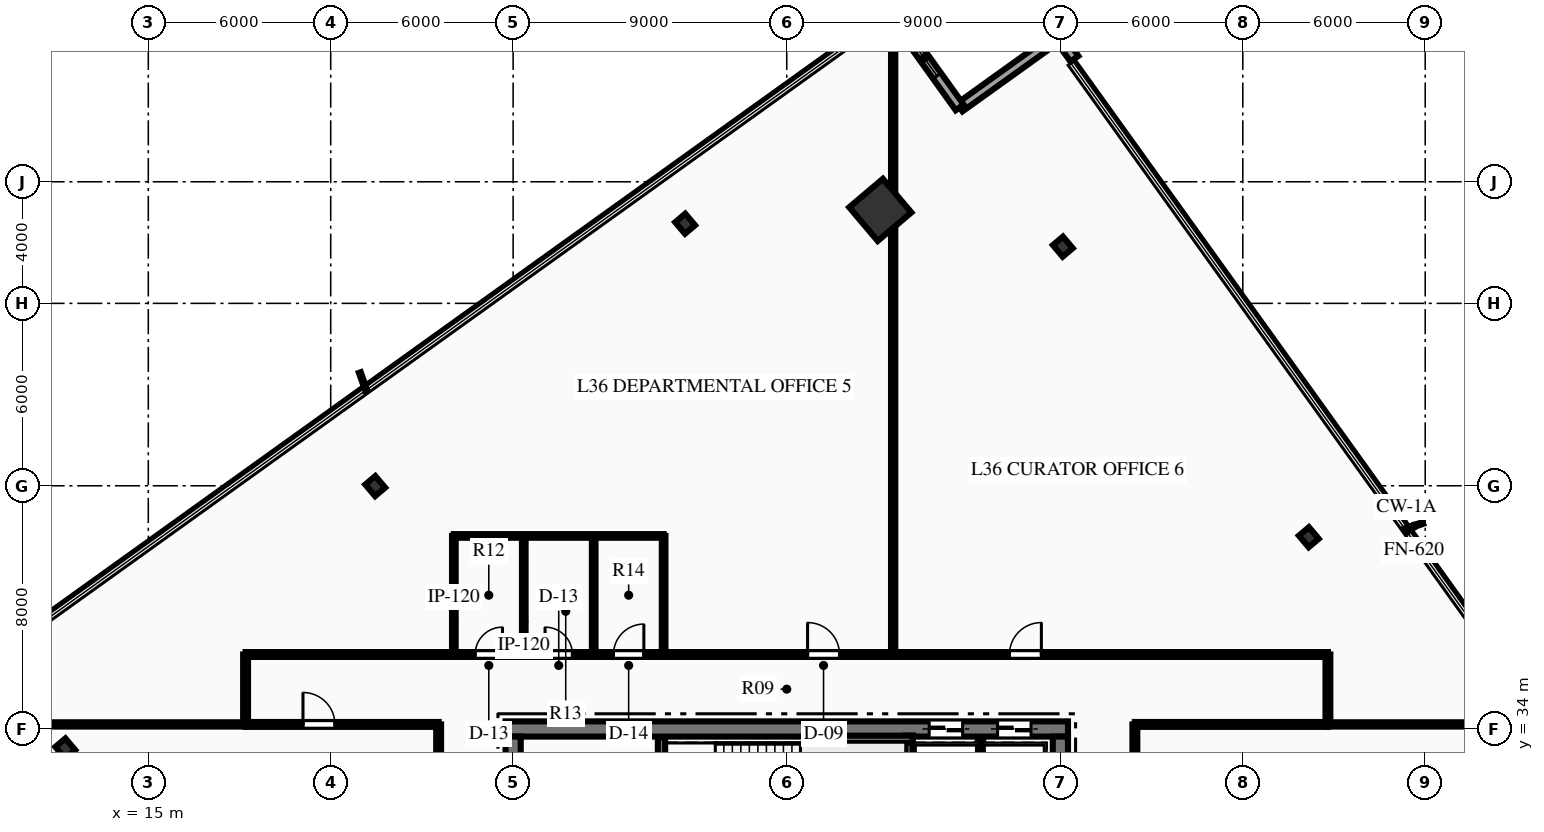
"""IFC4 building model, lengths in metres.
Left out: names, types, materials, properties, quantities, classifications, styles, units other than length and angle.
Written with IfcOpenShell. Run it as: python <this file> out.ifc"""

import sys

from ifc_helpers import new_model, si_unit, direction, frame, frame_2d, origin, origin_2d, place, context, subcontext, project, spatial, rectangle, hollow_rectangle, i_section, extrude, element, fill, save


model = new_model("IFC4")
c1 = context("Model", 3, precision=1e-05, world=origin(), true_north=direction((0.0, 1.0)))
c2 = subcontext(c1, "Body", "Model", "MODEL_VIEW")
j1 = project(units=[si_unit("LENGTHUNIT", "METRE"), si_unit("PLANEANGLEUNIT", "RADIAN")], contexts=[c1])
p1 = place(None, origin())
s1 = spatial("IfcSite", under=j1, at=p1, CompositionType="ELEMENT")
p2 = place(p1, origin())
s2 = spatial("IfcBuilding", under=s1, at=p2, CompositionType="ELEMENT")
p3 = place(p2, frame((0.0, 0.0, 148.2)))
s3 = spatial("IfcBuildingStorey", under=s2, at=p3, CompositionType="ELEMENT", Elevation=148.2)
p4 = place(p3, frame((26.75, 34.0, 0.0), z_axis=(0.0, 0.0, 1.0), x_axis=(1.0, 0.0, 0.0)))
e1 = element("IfcWall", 1, at=p4, inside=s3, PredefinedType="SHEAR", context=c2, shape_type="SweptSolid", body=[
    extrude(rectangle(XDim=18.5, YDim=0.5, at=frame_2d((9.25, 0.0))), origin(), (0.0, 0.0, 1.0), 3.75),
])
p5 = place(p4, frame((13.935, 0.0, 0.0)))
e2 = element("IfcOpeningElement", 2, at=p5, cuts=e1, PredefinedType="OPENING", context=c2, shape_type="SweptSolid", body=[
    extrude(rectangle(XDim=1.1, YDim=2.15, at=frame_2d((0.55, 1.075))), frame((0.0, 0.26, 0.0), z_axis=(0.0, -1.0, 0.0), x_axis=(1.0, 0.0, 0.0)), (0.0, 0.0, 1.0), 0.52),
])
p6 = place(p4, frame((16.185, 0.0, 0.0)))
e3 = element("IfcOpeningElement", 3, at=p6, cuts=e1, PredefinedType="OPENING", context=c2, shape_type="SweptSolid", body=[
    extrude(rectangle(XDim=1.1, YDim=2.15, at=frame_2d((0.55, 1.075))), frame((0.0, 0.26, 0.0), z_axis=(0.0, -1.0, 0.0), x_axis=(1.0, 0.0, 0.0)), (0.0, 0.0, 1.0), 0.52),
])
p7 = place(p3, frame((27.0, 18.25, 0.0), z_axis=(0.0, 0.0, 1.0), x_axis=(0.0, 1.0, 0.0)))
e4 = element("IfcWall", 4, at=p7, inside=s3, PredefinedType="SHEAR", context=c2, shape_type="SweptSolid", body=[
    extrude(rectangle(XDim=15.5, YDim=0.5, at=frame_2d((7.75, 0.0))), origin(), (0.0, 0.0, 1.0), 3.75),
])
p8 = place(p7, frame((9.99, 0.0, 0.0)))
e5 = element("IfcOpeningElement", 5, at=p8, cuts=e4, PredefinedType="OPENING", context=c2, shape_type="SweptSolid", body=[
    extrude(rectangle(XDim=1.4, YDim=2.2, at=frame_2d((0.7, 1.1))), frame((0.0, 0.26, 0.0), z_axis=(0.0, -1.0, 0.0), x_axis=(1.0, 0.0, 0.0)), (0.0, 0.0, 1.0), 0.52),
])
p9 = place(p3, frame((45.0, 18.25, 0.0), z_axis=(0.0, 0.0, 1.0), x_axis=(0.0, 1.0, 0.0)))
e6 = element("IfcWall", 6, at=p9, inside=s3, PredefinedType="SHEAR", context=c2, shape_type="SweptSolid", body=[
    extrude(rectangle(XDim=15.5, YDim=0.5, at=frame_2d((7.75, 0.0))), origin(), (0.0, 0.0, 1.0), 3.75),
])
p10 = place(p9, frame((9.99, 0.0, 0.0)))
e7 = element("IfcOpeningElement", 7, at=p10, cuts=e6, PredefinedType="OPENING", context=c2, shape_type="SweptSolid", body=[
    extrude(rectangle(XDim=1.4, YDim=2.2, at=frame_2d((0.7, 1.1))), frame((0.0, 0.26, 0.0), z_axis=(0.0, -1.0, 0.0), x_axis=(1.0, 0.0, 0.0)), (0.0, 0.0, 1.0), 0.52),
])
p11 = place(p3, frame((31.88, 29.93, 0.0), z_axis=(0.0, 0.0, 1.0), x_axis=(0.0, 1.0, 0.0)))
e8 = element("IfcWall", 8, at=p11, inside=s3, PredefinedType="SHEAR", context=c2, shape_type="SweptSolid", body=[
    extrude(rectangle(XDim=3.79, YDim=0.24, at=frame_2d((1.895, 0.0))), origin(), (0.0, 0.0, 1.0), 3.75),
])
p12 = place(p3, frame((40.02, 29.93, 0.0), z_axis=(0.0, 0.0, 1.0), x_axis=(0.0, 1.0, 0.0)))
e9 = element("IfcWall", 9, at=p12, inside=s3, PredefinedType="SHEAR", context=c2, shape_type="SweptSolid", body=[
    extrude(rectangle(XDim=3.85, YDim=0.24, at=frame_2d((1.925, 0.0))), origin(), (0.0, 0.0, 1.0), 3.75),
])
p13 = place(p3, frame((37.85, 33.66, 0.0), z_axis=(0.0, 0.0, 1.0), x_axis=(1.0, 0.0, 0.0)))
e10 = element("IfcWall", 10, at=p13, inside=s3, PredefinedType="SHEAR", context=c2, shape_type="SweptSolid", body=[
    extrude(rectangle(XDim=2.29, YDim=0.24, at=frame_2d((1.145, 0.0))), origin(), (0.0, 0.0, 1.0), 3.75),
])
p14 = place(p3, frame((39.077, 51.075, 0.0), z_axis=(0.0, 0.0, 1.0), x_axis=(0.763232469783, 0.646123979643, 0.0)))
e11 = element("IfcColumn", 11, at=p14, inside=s3, PredefinedType="COLUMN", context=c2, shape_type="SweptSolid", body=[
    extrude(hollow_rectangle(XDim=1.45, YDim=1.45, WallThickness=0.07, at=origin_2d()), origin(), (0.0, 0.0, 1.0), 3.75),
])
for number, where, z_axis, x_axis in (
    (12, (53.171, 40.307, 0.0), (0.0, 0.0, 1.0), (0.763, 0.646, 0.0)),
    (13, (45.08, 49.865, 0.0), (0.0, 0.0, 1.0), (0.763, 0.646, 0.0)),
    (14, (32.657, 50.619, 0.0), (0.0, 0.0, 1.0), (0.763, 0.646, 0.0)),
    (15, (22.464, 41.99, 0.0), (0.0, 0.0, 1.0), (0.763, 0.646, 0.0)),
    (16, (12.27, 33.36, 0.0), (0.0, 0.0, 1.0), (0.763, 0.646, 0.0)),
):
    element("IfcColumn", number, at=place(p3, frame(where, z_axis=z_axis, x_axis=x_axis)), inside=s3, PredefinedType="COLUMN", context=c2, shape_type="SweptSolid", body=[
        extrude(i_section(OverallWidth=0.432, OverallDepth=0.498, WebThickness=0.056, FlangeThickness=0.089, at=origin_2d()), origin(), (0.0, 0.0, 1.0), 3.75),
    ])
p15 = place(p3, frame((44.937, 56.777, 0.0), z_axis=(0.0, 0.0, 1.0), x_axis=(0.582981850939, -0.812485176157, 0.0)))
e17 = element("IfcWall", 17, at=p15, inside=s3, PredefinedType="STANDARD", context=c2, shape_type="SweptSolid", body=[
    extrude(rectangle(XDim=0.9, YDim=0.32, at=frame_2d((0.45, 0.0))), origin(), (0.0, 0.0, 1.0), 3.46),
])
p16 = place(p3, frame((41.687, 54.445, 0.0), z_axis=(0.0, 0.0, 1.0), x_axis=(0.812585382619, 0.582842170707, 0.0)))
e18 = element("IfcWall", 18, at=p16, inside=s3, PredefinedType="STANDARD", context=c2, shape_type="SweptSolid", body=[
    extrude(rectangle(XDim=4.0, YDim=0.32, at=frame_2d((2.0, 0.0))), origin(), (0.0, 0.0, 1.0), 3.46),
])
p17 = place(p3, frame((39.356, 57.696, 0.0), z_axis=(0.0, 0.0, 1.0), x_axis=(0.582813264105, -0.812606115645, 0.0)))
e19 = element("IfcWall", 19, at=p17, inside=s3, PredefinedType="STANDARD", context=c2, shape_type="SweptSolid", body=[
    extrude(rectangle(XDim=4.0, YDim=0.32, at=frame_2d((2.0, 0.0))), origin(), (0.0, 0.0, 1.0), 3.46),
])
p18 = place(p17, frame((1.275, 0.0, 0.85)))
e20 = element("IfcOpeningElement", 20, at=p18, cuts=e19, PredefinedType="OPENING", context=c2, shape_type="SweptSolid", body=[
    extrude(rectangle(XDim=1.45, YDim=2.05, at=frame_2d((0.725, 1.025))), frame((0.0, 0.17, 0.0), z_axis=(0.0, -1.0, 0.0), x_axis=(1.0, 0.0, 0.0)), (0.0, 0.0, 1.0), 0.34),
])
p19 = place(p3, frame((42.37, 29.9, 0.0), z_axis=(0.0, 0.0, 1.0), x_axis=(0.0, 1.0, 0.0)))
e21 = element("IfcWall", 21, at=p19, inside=s3, PredefinedType="PARTITIONING", context=c2, shape_type="SweptSolid", body=[
    extrude(rectangle(XDim=3.75, YDim=0.18, at=frame_2d((1.875, 0.0))), origin(), (0.0, 0.0, 1.0), 3.46),
])
p20 = place(p3, frame((18.2, 36.45, 0.0), z_axis=(0.0, 0.0, 1.0), x_axis=(1.0, 0.0, 0.0)))
e22 = element("IfcWall", 22, at=p20, inside=s3, PredefinedType="PARTITIONING", context=c2, shape_type="SweptSolid", body=[
    extrude(rectangle(XDim=35.6, YDim=0.16, at=frame_2d((17.8, 0.0))), origin(), (0.0, 0.0, 1.0), 3.46),
])
p21 = place(p20, frame((7.55, 0.0, 0.0)))
e23 = element("IfcOpeningElement", 23, at=p21, cuts=e22, PredefinedType="OPENING", context=c2, shape_type="SweptSolid", body=[
    extrude(rectangle(XDim=0.9, YDim=2.15, at=frame_2d((0.45, 1.075))), frame((0.0, 0.09, 0.0), z_axis=(0.0, -1.0, 0.0), x_axis=(1.0, 0.0, 0.0)), (0.0, 0.0, 1.0), 0.18),
])
p22 = place(p20, frame((9.85, 0.0, 0.0)))
e24 = element("IfcOpeningElement", 24, at=p22, cuts=e22, PredefinedType="OPENING", context=c2, shape_type="SweptSolid", body=[
    extrude(rectangle(XDim=0.9, YDim=2.15, at=frame_2d((0.45, 1.075))), frame((0.0, 0.09, 0.0), z_axis=(0.0, -1.0, 0.0), x_axis=(1.0, 0.0, 0.0)), (0.0, 0.0, 1.0), 0.18),
])
p23 = place(p20, frame((12.1, 0.0, 0.0)))
e25 = element("IfcOpeningElement", 25, at=p23, cuts=e22, PredefinedType="OPENING", context=c2, shape_type="SweptSolid", body=[
    extrude(rectangle(XDim=1.0, YDim=2.15, at=frame_2d((0.5, 1.075))), frame((0.0, 0.09, 0.0), z_axis=(0.0, -1.0, 0.0), x_axis=(1.0, 0.0, 0.0)), (0.0, 0.0, 1.0), 0.18),
])
p24 = place(p20, frame((18.485, 0.0, 0.0)))
e26 = element("IfcOpeningElement", 26, at=p24, cuts=e22, PredefinedType="OPENING", context=c2, shape_type="SweptSolid", body=[
    extrude(rectangle(XDim=1.05, YDim=2.15, at=frame_2d((0.525, 1.075))), frame((0.0, 0.09, 0.0), z_axis=(0.0, -1.0, 0.0), x_axis=(1.0, 0.0, 0.0)), (0.0, 0.0, 1.0), 0.18),
])
p25 = place(p20, frame((25.125, 0.0, 0.0)))
e27 = element("IfcOpeningElement", 27, at=p25, cuts=e22, PredefinedType="OPENING", context=c2, shape_type="SweptSolid", body=[
    extrude(rectangle(XDim=1.05, YDim=2.15, at=frame_2d((0.525, 1.075))), frame((0.0, 0.09, 0.0), z_axis=(0.0, -1.0, 0.0), x_axis=(1.0, 0.0, 0.0)), (0.0, 0.0, 1.0), 0.18),
])
p26 = place(p3, frame((18.2, 34.15, 0.0), z_axis=(0.0, 0.0, 1.0), x_axis=(1.0, 0.0, 0.0)))
e28 = element("IfcWall", 28, at=p26, inside=s3, PredefinedType="PARTITIONING", context=c2, shape_type="SweptSolid", body=[
    extrude(rectangle(XDim=6.35, YDim=0.16, at=frame_2d((3.175, 0.0))), origin(), (0.0, 0.0, 1.0), 3.46),
])
p27 = place(p26, frame((1.888, 0.0, 0.0)))
e29 = element("IfcOpeningElement", 29, at=p27, cuts=e28, PredefinedType="OPENING", context=c2, shape_type="SweptSolid", body=[
    extrude(rectangle(XDim=1.05, YDim=2.15, at=frame_2d((0.525, 1.075))), frame((0.0, 0.09, 0.0), z_axis=(0.0, -1.0, 0.0), x_axis=(1.0, 0.0, 0.0)), (0.0, 0.0, 1.0), 0.18),
])
p28 = place(p3, frame((47.45, 34.15, 0.0), z_axis=(0.0, 0.0, 1.0), x_axis=(1.0, 0.0, 0.0)))
e30 = element("IfcWall", 30, at=p28, inside=s3, PredefinedType="PARTITIONING", context=c2, shape_type="SweptSolid", body=[
    extrude(rectangle(XDim=6.35, YDim=0.16, at=frame_2d((3.175, 0.0))), origin(), (0.0, 0.0, 1.0), 3.46),
])
p29 = place(p3, frame((24.55, 17.85, 0.0), z_axis=(0.0, 0.0, 1.0), x_axis=(0.0, 1.0, 0.0)))
e31 = element("IfcWall", 31, at=p29, inside=s3, PredefinedType="PARTITIONING", context=c2, shape_type="SweptSolid", body=[
    extrude(rectangle(XDim=16.3, YDim=0.16, at=frame_2d((8.15, 0.0))), origin(), (0.0, 0.0, 1.0), 3.46),
])
p30 = place(p29, frame((6.375, 0.0, 0.0)))
e32 = element("IfcOpeningElement", 32, at=p30, cuts=e31, PredefinedType="OPENING", context=c2, shape_type="SweptSolid", body=[
    extrude(rectangle(XDim=1.05, YDim=2.15, at=frame_2d((0.525, 1.075))), frame((0.0, 0.09, 0.0), z_axis=(0.0, -1.0, 0.0), x_axis=(1.0, 0.0, 0.0)), (0.0, 0.0, 1.0), 0.18),
])
p31 = place(p3, frame((47.45, 27.25, 0.0), z_axis=(0.0, 0.0, 1.0), x_axis=(0.0, 1.0, 0.0)))
e33 = element("IfcWall", 33, at=p31, inside=s3, PredefinedType="PARTITIONING", context=c2, shape_type="SweptSolid", body=[
    extrude(rectangle(XDim=6.9, YDim=0.16, at=frame_2d((3.45, 0.0))), origin(), (0.0, 0.0, 1.0), 3.46),
])
p32 = place(p31, frame((1.683, 0.0, 0.0)))
e34 = element("IfcOpeningElement", 34, at=p32, cuts=e33, PredefinedType="OPENING", context=c2, shape_type="SweptSolid", body=[
    extrude(rectangle(XDim=1.05, YDim=2.15, at=frame_2d((0.525, 1.075))), frame((0.0, 0.09, 0.0), z_axis=(0.0, -1.0, 0.0), x_axis=(1.0, 0.0, 0.0)), (0.0, 0.0, 1.0), 0.18),
])
for number, where, z_axis, x_axis in (
    (35, (18.2, 34.15, 0.0), (0.0, 0.0, 1.0), (0.0, 1.0, 0.0)),
    (36, (53.8, 34.15, 0.0), (0.0, 0.0, 1.0), (0.0, 1.0, 0.0)),
):
    element("IfcWall", number, at=place(p3, frame(where, z_axis=z_axis, x_axis=x_axis)), inside=s3, PredefinedType="PARTITIONING", context=c2, shape_type="SweptSolid", body=[
        extrude(rectangle(XDim=2.3, YDim=0.16, at=frame_2d((1.15, 0.0))), origin(), (0.0, 0.0, 1.0), 3.46),
    ])
for number, where, z_axis, x_axis in (
    (37, (25.05, 36.45, 0.0), (0.0, 0.0, 1.0), (0.0, 1.0, 0.0)),
    (38, (27.35, 36.45, 0.0), (0.0, 0.0, 1.0), (0.0, 1.0, 0.0)),
    (39, (29.65, 36.45, 0.0), (0.0, 0.0, 1.0), (0.0, 1.0, 0.0)),
    (40, (31.95, 36.45, 0.0), (0.0, 0.0, 1.0), (0.0, 1.0, 0.0)),
):
    element("IfcWall", number, at=place(p3, frame(where, z_axis=z_axis, x_axis=x_axis)), inside=s3, PredefinedType="PARTITIONING", context=c2, shape_type="SweptSolid", body=[
        extrude(rectangle(XDim=3.9, YDim=0.12, at=frame_2d((1.95, 0.0))), origin(), (0.0, 0.0, 1.0), 3.46),
    ])
p33 = place(p3, frame((25.05, 40.35, 0.0), z_axis=(0.0, 0.0, 1.0), x_axis=(1.0, 0.0, 0.0)))
e41 = element("IfcWall", 41, at=p33, inside=s3, PredefinedType="PARTITIONING", context=c2, shape_type="SweptSolid", body=[
    extrude(rectangle(XDim=6.9, YDim=0.12, at=frame_2d((3.45, 0.0))), origin(), (0.0, 0.0, 1.0), 3.46),
])
p34 = place(p3, frame((6.596, 34.15, 0.0), z_axis=(0.0, 0.0, 1.0), x_axis=(1.0, 0.0, 0.0)))
e42 = element("IfcWall", 42, at=p34, inside=s3, PredefinedType="PARTITIONING", context=c2, shape_type="SweptSolid", body=[
    extrude(rectangle(XDim=11.604, YDim=0.14, at=frame_2d((5.802, 0.0))), origin(), (0.0, 0.0, 1.0), 3.46),
])
p35 = place(p3, frame((53.8, 34.15, 0.0), z_axis=(0.0, 0.0, 1.0), x_axis=(1.0, 0.0, 0.0)))
e43 = element("IfcWall", 43, at=p35, inside=s3, PredefinedType="PARTITIONING", context=c2, shape_type="SweptSolid", body=[
    extrude(rectangle(XDim=7.317, YDim=0.14, at=frame_2d((3.659, 0.0))), origin(), (0.0, 0.0, 1.0), 3.46),
])
p36 = place(p3, frame((39.5, 36.45, 0.0), z_axis=(0.0, 0.0, 1.0), x_axis=(0.0, 1.0, 0.0)))
e44 = element("IfcWall", 44, at=p36, inside=s3, PredefinedType="PARTITIONING", context=c2, shape_type="SweptSolid", body=[
    extrude(rectangle(XDim=20.976, YDim=0.14, at=frame_2d((10.488, 0.0))), origin(), (0.0, 0.0, 1.0), 3.46),
])
p37 = place(p18, origin())
e45 = element("IfcWindow", 45, at=p37, inside=s3, PartitioningType="SINGLE_PANEL", PredefinedType="WINDOW", context=c2, shape_type="SweptSolid", body=[
    extrude(rectangle(XDim=1.45, YDim=2.05, at=frame_2d((0.725, 1.025))), frame((0.0, 0.03, 0.0), z_axis=(0.0, -1.0, 0.0), x_axis=(1.0, 0.0, 0.0)), (0.0, 0.0, 1.0), 0.06),
])
fill(e20, e45)
p38 = place(p21, origin())
e46 = element("IfcDoor", 46, at=p38, inside=s3, OperationType="SINGLE_SWING_RIGHT", PredefinedType="DOOR", context=c2, shape_type="SweptSolid", body=[
    extrude(rectangle(XDim=0.9, YDim=2.15, at=frame_2d((0.45, 1.075))), frame((0.0, 0.025, 0.0), z_axis=(0.0, -1.0, 0.0), x_axis=(1.0, 0.0, 0.0)), (0.0, 0.0, 1.0), 0.05),
])
fill(e23, e46)
p39 = place(p22, origin())
e47 = element("IfcDoor", 47, at=p39, inside=s3, OperationType="SINGLE_SWING_LEFT", PredefinedType="DOOR", context=c2, shape_type="SweptSolid", body=[
    extrude(rectangle(XDim=0.9, YDim=2.15, at=frame_2d((0.45, 1.075))), frame((0.0, 0.025, 0.0), z_axis=(0.0, -1.0, 0.0), x_axis=(1.0, 0.0, 0.0)), (0.0, 0.0, 1.0), 0.05),
])
fill(e24, e47)
p40 = place(p23, origin())
e48 = element("IfcDoor", 48, at=p40, inside=s3, OperationType="SINGLE_SWING_RIGHT", PredefinedType="DOOR", context=c2, shape_type="SweptSolid", body=[
    extrude(rectangle(XDim=1.0, YDim=2.15, at=frame_2d((0.5, 1.075))), frame((0.0, 0.025, 0.0), z_axis=(0.0, -1.0, 0.0), x_axis=(1.0, 0.0, 0.0)), (0.0, 0.0, 1.0), 0.05),
])
fill(e25, e48)
p41 = place(p24, origin())
e49 = element("IfcDoor", 49, at=p41, inside=s3, OperationType="SINGLE_SWING_LEFT", PredefinedType="DOOR", context=c2, shape_type="SweptSolid", body=[
    extrude(rectangle(XDim=1.05, YDim=2.15, at=frame_2d((0.525, 1.075))), frame((0.0, 0.025, 0.0), z_axis=(0.0, -1.0, 0.0), x_axis=(1.0, 0.0, 0.0)), (0.0, 0.0, 1.0), 0.05),
])
fill(e26, e49)
p42 = place(p25, origin())
e50 = element("IfcDoor", 50, at=p42, inside=s3, OperationType="SINGLE_SWING_RIGHT", PredefinedType="DOOR", context=c2, shape_type="SweptSolid", body=[
    extrude(rectangle(XDim=1.05, YDim=2.15, at=frame_2d((0.525, 1.075))), frame((0.0, 0.025, 0.0), z_axis=(0.0, -1.0, 0.0), x_axis=(1.0, 0.0, 0.0)), (0.0, 0.0, 1.0), 0.05),
])
fill(e27, e50)
p43 = place(p27, origin())
e51 = element("IfcDoor", 51, at=p43, inside=s3, OperationType="SINGLE_SWING_LEFT", PredefinedType="DOOR", context=c2, shape_type="SweptSolid", body=[
    extrude(rectangle(XDim=1.05, YDim=2.15, at=frame_2d((0.525, 1.075))), frame((0.0, 0.025, 0.0), z_axis=(0.0, -1.0, 0.0), x_axis=(1.0, 0.0, 0.0)), (0.0, 0.0, 1.0), 0.05),
])
fill(e29, e51)
p44 = place(p5, origin())
e52 = element("IfcDoor", 52, at=p44, inside=s3, OperationType="SLIDING_TO_LEFT", PredefinedType="DOOR", context=c2, shape_type="SweptSolid", body=[
    extrude(rectangle(XDim=1.1, YDim=2.15, at=frame_2d((0.55, 1.075))), frame((0.0, 0.025, 0.0), z_axis=(0.0, -1.0, 0.0), x_axis=(1.0, 0.0, 0.0)), (0.0, 0.0, 1.0), 0.05),
])
fill(e2, e52)
p45 = place(p6, origin())
e53 = element("IfcDoor", 53, at=p45, inside=s3, OperationType="SLIDING_TO_LEFT", PredefinedType="DOOR", context=c2, shape_type="SweptSolid", body=[
    extrude(rectangle(XDim=1.1, YDim=2.15, at=frame_2d((0.55, 1.075))), frame((0.0, 0.025, 0.0), z_axis=(0.0, -1.0, 0.0), x_axis=(1.0, 0.0, 0.0)), (0.0, 0.0, 1.0), 0.05),
])
fill(e3, e53)
save(model, sys.argv[1])
